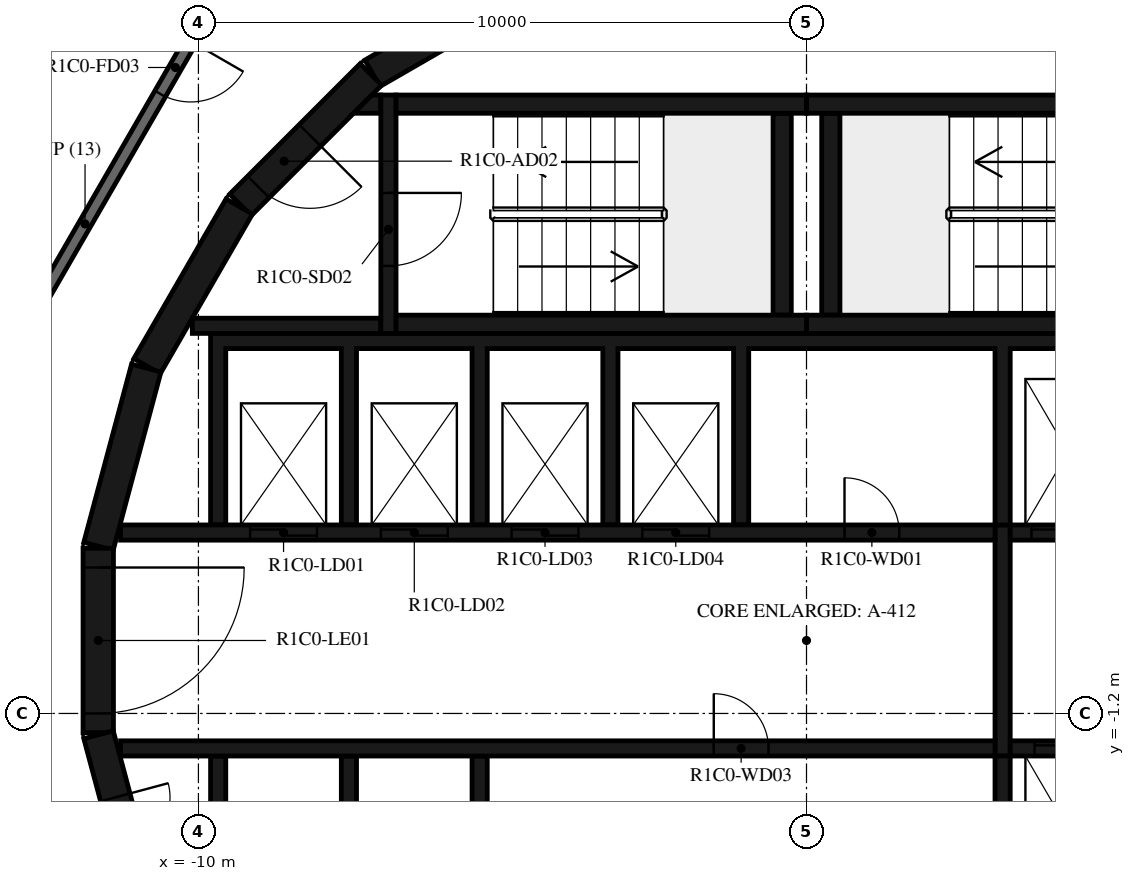
"""IFC4 building model, lengths in metres.
Left out: names, types, materials, properties, quantities, classifications, styles, units other than length and angle.
Written with IfcOpenShell. Run it as: python <this file> out.ifc"""

import sys

from ifc_helpers import new_model, si_unit, direction, frame, frame_2d, origin, place, context, subcontext, project, spatial, polyline, rectangle, outline, extrude, element, fill, save


model = new_model("IFC4")
c1 = context("Model", 3, precision=1e-05, world=origin(), true_north=direction((0.0, 1.0)))
c2 = subcontext(c1, "Body", "Model", "MODEL_VIEW")
j1 = project(units=[si_unit("LENGTHUNIT", "METRE"), si_unit("PLANEANGLEUNIT", "RADIAN")], contexts=[c1])
p1 = place(None, origin())
s1 = spatial("IfcSite", under=j1, at=p1, CompositionType="ELEMENT")
p2 = place(p1, origin())
s2 = spatial("IfcBuilding", under=s1, at=p2, CompositionType="ELEMENT")
p3 = place(p2, frame((0.0, 0.0, 59.4)))
s3 = spatial("IfcBuildingStorey", under=s2, at=p3, CompositionType="ELEMENT", Elevation=59.4)
p4 = place(p3, frame((-4.51, 10.845, 0.0), z_axis=(0.0, 0.0, 1.0), x_axis=(-0.865975092491, -0.500087131594, 0.0)))
e1 = element("IfcWall", 1, at=p4, inside=s3, PredefinedType="SHEAR", context=c2, shape_type="SweptSolid", body=[
    extrude(rectangle(XDim=3.033, YDim=0.5, at=frame_2d((1.516, 0.0))), origin(), (0.0, 0.0, 1.0), 3.12),
])
p5 = place(p3, frame((-7.164, 9.308, 0.0), z_axis=(0.0, 0.0, 1.0), x_axis=(-0.707106781187, -0.707106781187, 0.0)))
e2 = element("IfcWall", 2, at=p5, inside=s3, PredefinedType="SHEAR", context=c2, shape_type="SweptSolid", body=[
    extrude(rectangle(XDim=3.032, YDim=0.5, at=frame_2d((1.516, 0.0))), origin(), (0.0, 0.0, 1.0), 3.12),
])
p6 = place(p5, frame((1.416, 0.0, 0.0)))
e3 = element("IfcOpeningElement", 3, at=p6, cuts=e2, PredefinedType="OPENING", context=c2, shape_type="SweptSolid", body=[
    extrude(rectangle(XDim=1.2, YDim=2.1, at=frame_2d((0.6, 1.05))), frame((0.0, 0.26, 0.0), z_axis=(0.0, -1.0, 0.0), x_axis=(1.0, 0.0, 0.0)), (0.0, 0.0, 1.0), 0.52),
])
for number, where, z_axis, x_axis in (
    (4, (-9.329, 7.137, 0.0), (0.0, 0.0, 1.0), (-0.5, -0.866, 0.0)),
    (5, (-10.858, 4.479, 0.0), (0.0, 0.0, 1.0), (-0.259, -0.966, 0.0)),
):
    element("IfcWall", number, at=place(p3, frame(where, z_axis=z_axis, x_axis=x_axis)), inside=s3, PredefinedType="SHEAR", context=c2, shape_type="SweptSolid", body=[
        extrude(rectangle(XDim=3.033, YDim=0.5, at=frame_2d((1.516, 0.0))), origin(), (0.0, 0.0, 1.0), 3.12),
    ])
p7 = place(p3, frame((-11.647, 1.516, 0.0), z_axis=(0.0, 0.0, 1.0), x_axis=(0.0, -1.0, 0.0)))
e6 = element("IfcWall", 6, at=p7, inside=s3, PredefinedType="SHEAR", context=c2, shape_type="SweptSolid", body=[
    extrude(rectangle(XDim=3.033, YDim=0.5, at=frame_2d((1.516, 0.0))), origin(), (0.0, 0.0, 1.0), 3.12),
])
p8 = place(p7, frame((0.316, 0.0, 0.0)))
e7 = element("IfcOpeningElement", 7, at=p8, cuts=e6, PredefinedType="OPENING", context=c2, shape_type="SweptSolid", body=[
    extrude(rectangle(XDim=2.4, YDim=2.1, at=frame_2d((1.2, 1.05))), frame((0.0, 0.26, 0.0), z_axis=(0.0, -1.0, 0.0), x_axis=(1.0, 0.0, 0.0)), (0.0, 0.0, 1.0), 0.52),
])
p9 = place(p3, frame((-11.643, -1.55, 0.0), z_axis=(0.0, 0.0, 1.0), x_axis=(0.258734743916, -0.965948410781, 0.0)))
e8 = element("IfcWall", 8, at=p9, inside=s3, PredefinedType="SHEAR", context=c2, shape_type="SweptSolid", body=[
    extrude(rectangle(XDim=3.033, YDim=0.5, at=frame_2d((1.516, 0.0))), origin(), (0.0, 0.0, 1.0), 3.12),
])
p10 = place(p9, frame((1.066, 0.0, 0.0)))
e9 = element("IfcOpeningElement", 9, at=p10, cuts=e8, PredefinedType="OPENING", context=c2, shape_type="SweptSolid", body=[
    extrude(rectangle(XDim=0.9, YDim=2.1, at=frame_2d((0.45, 1.05))), frame((0.0, 0.26, 0.0), z_axis=(0.0, -1.0, 0.0), x_axis=(1.0, 0.0, 0.0)), (0.0, 0.0, 1.0), 0.52),
])
for number, where, z_axis, x_axis in (
    (10, (0.0, 5.2, 0.0), (0.0, 0.0, 1.0), (1.0, 0.0, 0.0)),
    (11, (0.0, 8.82, 0.0), (0.0, 0.0, 1.0), (1.0, 0.0, 0.0)),
):
    element("IfcWall", number, at=place(p3, frame(where, z_axis=z_axis, x_axis=x_axis)), inside=s3, PredefinedType="SHEAR", context=c2, shape_type="SweptSolid", body=[
        extrude(rectangle(XDim=6.75, YDim=0.3, at=frame_2d((3.375, 0.0))), origin(), (0.0, 0.0, 1.0), 3.12),
    ])
p11 = place(p3, frame((0.4, 5.35, 0.0), z_axis=(0.0, 0.0, 1.0), x_axis=(0.0, 1.0, 0.0)))
e12 = element("IfcWall", 12, at=p11, inside=s3, PredefinedType="SHEAR", context=c2, shape_type="SweptSolid", body=[
    extrude(rectangle(XDim=3.32, YDim=0.3, at=frame_2d((1.66, 0.0))), origin(), (0.0, 0.0, 1.0), 3.12),
])
for number, where, z_axis, x_axis in (
    (13, (-6.75, 5.2, 0.0), (0.0, 0.0, 1.0), (1.0, 0.0, 0.0)),
    (14, (-6.75, 8.82, 0.0), (0.0, 0.0, 1.0), (1.0, 0.0, 0.0)),
):
    element("IfcWall", number, at=place(p3, frame(where, z_axis=z_axis, x_axis=x_axis)), inside=s3, PredefinedType="SHEAR", context=c2, shape_type="SweptSolid", body=[
        extrude(rectangle(XDim=6.75, YDim=0.3, at=frame_2d((3.375, 0.0))), origin(), (0.0, 0.0, 1.0), 3.12),
    ])
p12 = place(p3, frame((-0.4, 5.35, 0.0), z_axis=(0.0, 0.0, 1.0), x_axis=(0.0, 1.0, 0.0)))
e15 = element("IfcWall", 15, at=p12, inside=s3, PredefinedType="SHEAR", context=c2, shape_type="SweptSolid", body=[
    extrude(rectangle(XDim=3.32, YDim=0.3, at=frame_2d((1.66, 0.0))), origin(), (0.0, 0.0, 1.0), 3.12),
])
p13 = place(p3, frame((-6.875, 8.97, 0.0), z_axis=(0.0, 0.0, 1.0), x_axis=(0.0, -1.0, 0.0)))
e16 = element("IfcWall", 16, at=p13, inside=s3, PredefinedType="SHEAR", context=c2, shape_type="SweptSolid", body=[
    extrude(rectangle(XDim=3.92, YDim=0.25, at=frame_2d((1.96, 0.0))), origin(), (0.0, 0.0, 1.0), 3.12),
])
p14 = place(p13, frame((1.61, 0.0, 0.0)))
e17 = element("IfcOpeningElement", 17, at=p14, cuts=e16, PredefinedType="OPENING", context=c2, shape_type="SweptSolid", body=[
    extrude(rectangle(XDim=1.2, YDim=2.1, at=frame_2d((0.6, 1.05))), frame((0.0, 0.135, 0.0), z_axis=(0.0, -1.0, 0.0), x_axis=(1.0, 0.0, 0.0)), (0.0, 0.0, 1.0), 0.27),
])
p15 = place(p3, frame((-7.0, 5.175, 0.0), z_axis=(0.0, 0.0, 1.0), x_axis=(-1.0, 0.0, 0.0)))
e18 = element("IfcWall", 18, at=p15, inside=s3, PredefinedType="SHEAR", context=c2, shape_type="SweptSolid", body=[
    extrude(rectangle(XDim=3.1, YDim=0.25, at=frame_2d((1.55, 0.0))), origin(), (0.0, 0.0, 1.0), 3.12),
])
p16 = place(p3, origin())
e19 = element("IfcWall", 19, at=p16, inside=s3, PredefinedType="SHEAR", context=c2, shape_type="SweptSolid", body=[
    extrude(outline(polyline([(-7.148, 8.97), (-7.0, 8.97), (-7.0, 8.67), (-7.448, 8.67), (-7.148, 8.97)])), origin(), (0.0, 0.0, 1.0), 3.12),
])
p17 = place(p3, origin())
e20 = element("IfcWall", 20, at=p17, inside=s3, PredefinedType="SHEAR", context=c2, shape_type="SweptSolid", body=[
    extrude(outline(polyline([(-9.55, 4.8), (-7.65, 4.8), (-7.65, 1.9), (-7.4, 1.9), (-7.4, 4.8), (-5.5, 4.8), (-5.5, 1.9), (-5.25, 1.9), (-5.25, 4.8), (-3.35, 4.8), (-3.35, 1.9), (-3.1, 1.9), (-3.1, 4.8), (-1.2, 4.8), (-1.2, 1.9), (-0.95, 1.9), (-0.95, 4.8), (3.1, 4.8), (3.1, 1.9), (3.35, 1.9), (3.35, 4.8), (5.25, 4.8), (5.25, 1.9), (5.5, 1.9), (5.5, 4.8), (7.4, 4.8), (7.4, 1.9), (7.65, 1.9), (7.65, 4.8), (9.55, 4.8), (9.55, 1.9), (9.8, 1.9), (9.8, 4.8), (9.8, 5.05), (-9.8, 5.05), (-9.8, 4.8), (-9.8, 1.9), (-9.55, 1.9), (-9.55, 4.8)])), origin(), (0.0, 0.0, 1.0), 3.12),
])
p18 = place(p3, origin())
e21 = element("IfcWall", 21, at=p18, inside=s3, PredefinedType="SHEAR", context=c2, shape_type="SweptSolid", body=[
    extrude(outline(polyline([(9.8, -5.05), (9.8, -4.8), (9.8, -1.9), (9.55, -1.9), (9.55, -4.8), (7.65, -4.8), (7.65, -1.9), (7.4, -1.9), (7.4, -4.8), (5.5, -4.8), (5.5, -1.9), (5.25, -1.9), (5.25, -4.8), (3.35, -4.8), (3.35, -1.9), (3.1, -1.9), (3.1, -4.8), (-5.25, -4.8), (-5.25, -1.9), (-5.5, -1.9), (-5.5, -4.8), (-7.4, -4.8), (-7.4, -1.9), (-7.65, -1.9), (-7.65, -4.8), (-9.55, -4.8), (-9.55, -1.9), (-9.8, -1.9), (-9.8, -4.8), (-9.8, -5.05), (9.8, -5.05)])), origin(), (0.0, 0.0, 1.0), 3.12),
])
p19 = place(p3, frame((-11.28, 1.775, 0.0), z_axis=(0.0, 0.0, 1.0), x_axis=(1.0, 0.0, 0.0)))
e22 = element("IfcWall", 22, at=p19, inside=s3, PredefinedType="SHEAR", context=c2, shape_type="SweptSolid", body=[
    extrude(rectangle(XDim=14.38, YDim=0.25, at=frame_2d((7.19, 0.0))), origin(), (0.0, 0.0, 1.0), 3.12),
])
p20 = place(p19, frame((2.13, 0.0, 0.0)))
e23 = element("IfcOpeningElement", 23, at=p20, cuts=e22, PredefinedType="OPENING", context=c2, shape_type="SweptSolid", body=[
    extrude(rectangle(XDim=1.1, YDim=2.1, at=frame_2d((0.55, 1.05))), frame((0.0, 0.135, 0.0), z_axis=(0.0, -1.0, 0.0), x_axis=(1.0, 0.0, 0.0)), (0.0, 0.0, 1.0), 0.27),
])
p21 = place(p19, frame((4.28, 0.0, 0.0)))
e24 = element("IfcOpeningElement", 24, at=p21, cuts=e22, PredefinedType="OPENING", context=c2, shape_type="SweptSolid", body=[
    extrude(rectangle(XDim=1.1, YDim=2.1, at=frame_2d((0.55, 1.05))), frame((0.0, 0.135, 0.0), z_axis=(0.0, -1.0, 0.0), x_axis=(1.0, 0.0, 0.0)), (0.0, 0.0, 1.0), 0.27),
])
p22 = place(p19, frame((6.43, 0.0, 0.0)))
e25 = element("IfcOpeningElement", 25, at=p22, cuts=e22, PredefinedType="OPENING", context=c2, shape_type="SweptSolid", body=[
    extrude(rectangle(XDim=1.1, YDim=2.1, at=frame_2d((0.55, 1.05))), frame((0.0, 0.135, 0.0), z_axis=(0.0, -1.0, 0.0), x_axis=(1.0, 0.0, 0.0)), (0.0, 0.0, 1.0), 0.27),
])
p23 = place(p19, frame((8.58, 0.0, 0.0)))
e26 = element("IfcOpeningElement", 26, at=p23, cuts=e22, PredefinedType="OPENING", context=c2, shape_type="SweptSolid", body=[
    extrude(rectangle(XDim=1.1, YDim=2.1, at=frame_2d((0.55, 1.05))), frame((0.0, 0.135, 0.0), z_axis=(0.0, -1.0, 0.0), x_axis=(1.0, 0.0, 0.0)), (0.0, 0.0, 1.0), 0.27),
])
p24 = place(p19, frame((11.905, 0.0, 0.0)))
e27 = element("IfcOpeningElement", 27, at=p24, cuts=e22, PredefinedType="OPENING", context=c2, shape_type="SweptSolid", body=[
    extrude(rectangle(XDim=0.9, YDim=2.1, at=frame_2d((0.45, 1.05))), frame((0.0, 0.135, 0.0), z_axis=(0.0, -1.0, 0.0), x_axis=(1.0, 0.0, 0.0)), (0.0, 0.0, 1.0), 0.27),
])
p25 = place(p3, frame((3.35, 1.775, 0.0), z_axis=(0.0, 0.0, 1.0), x_axis=(1.0, 0.0, 0.0)))
e28 = element("IfcWall", 28, at=p25, inside=s3, PredefinedType="SHEAR", context=c2, shape_type="SweptSolid", body=[
    extrude(rectangle(XDim=7.93, YDim=0.25, at=frame_2d((3.965, 0.0))), origin(), (0.0, 0.0, 1.0), 3.12),
])
p26 = place(p25, frame((0.35, 0.0, 0.0)))
e29 = element("IfcOpeningElement", 29, at=p26, cuts=e28, PredefinedType="OPENING", context=c2, shape_type="SweptSolid", body=[
    extrude(rectangle(XDim=1.2, YDim=2.4, at=frame_2d((0.6, 1.2))), frame((0.0, 0.135, 0.0), z_axis=(0.0, -1.0, 0.0), x_axis=(1.0, 0.0, 0.0)), (0.0, 0.0, 1.0), 0.27),
])
p27 = place(p25, frame((2.5, 0.0, 0.0)))
e30 = element("IfcOpeningElement", 30, at=p27, cuts=e28, PredefinedType="OPENING", context=c2, shape_type="SweptSolid", body=[
    extrude(rectangle(XDim=1.2, YDim=2.4, at=frame_2d((0.6, 1.2))), frame((0.0, 0.135, 0.0), z_axis=(0.0, -1.0, 0.0), x_axis=(1.0, 0.0, 0.0)), (0.0, 0.0, 1.0), 0.27),
])
p28 = place(p25, frame((4.8, 0.0, 0.0)))
e31 = element("IfcOpeningElement", 31, at=p28, cuts=e28, PredefinedType="OPENING", context=c2, shape_type="SweptSolid", body=[
    extrude(rectangle(XDim=0.9, YDim=2.1, at=frame_2d((0.45, 1.05))), frame((0.0, 0.135, 0.0), z_axis=(0.0, -1.0, 0.0), x_axis=(1.0, 0.0, 0.0)), (0.0, 0.0, 1.0), 0.27),
])
p29 = place(p3, frame((-11.28, -1.775, 0.0), z_axis=(0.0, 0.0, 1.0), x_axis=(1.0, 0.0, 0.0)))
e32 = element("IfcWall", 32, at=p29, inside=s3, PredefinedType="SHEAR", context=c2, shape_type="SweptSolid", body=[
    extrude(rectangle(XDim=14.38, YDim=0.25, at=frame_2d((7.19, 0.0))), origin(), (0.0, 0.0, 1.0), 3.12),
])
p30 = place(p29, frame((9.755, 0.0, 0.0)))
e33 = element("IfcOpeningElement", 33, at=p30, cuts=e32, PredefinedType="OPENING", context=c2, shape_type="SweptSolid", body=[
    extrude(rectangle(XDim=0.9, YDim=2.1, at=frame_2d((0.45, 1.05))), frame((0.0, 0.135, 0.0), z_axis=(0.0, -1.0, 0.0), x_axis=(1.0, 0.0, 0.0)), (0.0, 0.0, 1.0), 0.27),
])
p31 = place(p3, frame((3.35, -1.775, 0.0), z_axis=(0.0, 0.0, 1.0), x_axis=(1.0, 0.0, 0.0)))
e34 = element("IfcWall", 34, at=p31, inside=s3, PredefinedType="SHEAR", context=c2, shape_type="SweptSolid", body=[
    extrude(rectangle(XDim=7.93, YDim=0.25, at=frame_2d((3.965, 0.0))), origin(), (0.0, 0.0, 1.0), 3.12),
])
p32 = place(p31, frame((0.4, 0.0, 0.0)))
e35 = element("IfcOpeningElement", 35, at=p32, cuts=e34, PredefinedType="OPENING", context=c2, shape_type="SweptSolid", body=[
    extrude(rectangle(XDim=1.1, YDim=2.4, at=frame_2d((0.55, 1.2))), frame((0.0, 0.135, 0.0), z_axis=(0.0, -1.0, 0.0), x_axis=(1.0, 0.0, 0.0)), (0.0, 0.0, 1.0), 0.27),
])
p33 = place(p31, frame((2.55, 0.0, 0.0)))
e36 = element("IfcOpeningElement", 36, at=p33, cuts=e34, PredefinedType="OPENING", context=c2, shape_type="SweptSolid", body=[
    extrude(rectangle(XDim=1.1, YDim=2.4, at=frame_2d((0.55, 1.2))), frame((0.0, 0.135, 0.0), z_axis=(0.0, -1.0, 0.0), x_axis=(1.0, 0.0, 0.0)), (0.0, 0.0, 1.0), 0.27),
])
p34 = place(p31, frame((4.7, 0.0, 0.0)))
e37 = element("IfcOpeningElement", 37, at=p34, cuts=e34, PredefinedType="OPENING", context=c2, shape_type="SweptSolid", body=[
    extrude(rectangle(XDim=1.1, YDim=2.4, at=frame_2d((0.55, 1.2))), frame((0.0, 0.135, 0.0), z_axis=(0.0, -1.0, 0.0), x_axis=(1.0, 0.0, 0.0)), (0.0, 0.0, 1.0), 0.27),
])
p35 = place(p3, frame((3.225, -1.9, 0.0), z_axis=(0.0, 0.0, 1.0), x_axis=(0.0, 1.0, 0.0)))
e38 = element("IfcWall", 38, at=p35, inside=s3, PredefinedType="SHEAR", context=c2, shape_type="SweptSolid", body=[
    extrude(rectangle(XDim=3.8, YDim=0.25, at=frame_2d((1.9, 0.0))), origin(), (0.0, 0.0, 1.0), 3.12),
])
p36 = place(p3, frame((-10.029, 10.029, 0.0), z_axis=(0.0, 0.0, 1.0), x_axis=(-0.500001669485, -0.866024439905, 0.0)))
e39 = element("IfcWall", 39, at=p36, inside=s3, PredefinedType="STANDARD", context=c2, shape_type="SweptSolid", body=[
    extrude(rectangle(XDim=7.342, YDim=0.2, at=frame_2d((3.671, 0.0))), origin(), (0.0, 0.0, 1.0), 3.12),
])
p37 = place(p36, frame((0.2, 0.0, 0.0)))
e40 = element("IfcOpeningElement", 40, at=p37, cuts=e39, PredefinedType="OPENING", context=c2, shape_type="SweptSolid", body=[
    extrude(rectangle(XDim=1.0, YDim=2.1, at=frame_2d((0.5, 1.05))), frame((0.0, 0.11, 0.0), z_axis=(0.0, -1.0, 0.0), x_axis=(1.0, 0.0, 0.0)), (0.0, 0.0, 1.0), 0.22),
])
p38 = place(p14, origin())
e41 = element("IfcDoor", 41, at=p38, inside=s3, OperationType="SINGLE_SWING_LEFT", PredefinedType="DOOR", context=c2, shape_type="SweptSolid", body=[
    extrude(rectangle(XDim=1.2, YDim=2.1, at=frame_2d((0.6, 1.05))), frame((0.0, 0.025, 0.0), z_axis=(0.0, -1.0, 0.0), x_axis=(1.0, 0.0, 0.0)), (0.0, 0.0, 1.0), 0.05),
])
fill(e17, e41)
p39 = place(p6, origin())
e42 = element("IfcDoor", 42, at=p39, inside=s3, OperationType="SINGLE_SWING_RIGHT", PredefinedType="DOOR", context=c2, shape_type="SweptSolid", body=[
    extrude(rectangle(XDim=1.2, YDim=2.1, at=frame_2d((0.6, 1.05))), frame((0.0, 0.025, 0.0), z_axis=(0.0, -1.0, 0.0), x_axis=(1.0, 0.0, 0.0)), (0.0, 0.0, 1.0), 0.05),
])
fill(e3, e42)
p40 = place(p8, origin())
e43 = element("IfcDoor", 43, at=p40, inside=s3, OperationType="DOUBLE_DOOR_SINGLE_SWING", PredefinedType="DOOR", context=c2, shape_type="SweptSolid", body=[
    extrude(rectangle(XDim=2.4, YDim=2.1, at=frame_2d((1.2, 1.05))), frame((0.0, 0.025, 0.0), z_axis=(0.0, -1.0, 0.0), x_axis=(1.0, 0.0, 0.0)), (0.0, 0.0, 1.0), 0.05),
])
fill(e7, e43)
p41 = place(p20, origin())
e44 = element("IfcDoor", 44, at=p41, inside=s3, OperationType="DOUBLE_DOOR_SLIDING", PredefinedType="DOOR", context=c2, shape_type="SweptSolid", body=[
    extrude(rectangle(XDim=1.1, YDim=2.1, at=frame_2d((0.55, 1.05))), frame((0.0, 0.025, 0.0), z_axis=(0.0, -1.0, 0.0), x_axis=(1.0, 0.0, 0.0)), (0.0, 0.0, 1.0), 0.05),
])
fill(e23, e44)
p42 = place(p21, origin())
e45 = element("IfcDoor", 45, at=p42, inside=s3, OperationType="DOUBLE_DOOR_SLIDING", PredefinedType="DOOR", context=c2, shape_type="SweptSolid", body=[
    extrude(rectangle(XDim=1.1, YDim=2.1, at=frame_2d((0.55, 1.05))), frame((0.0, 0.025, 0.0), z_axis=(0.0, -1.0, 0.0), x_axis=(1.0, 0.0, 0.0)), (0.0, 0.0, 1.0), 0.05),
])
fill(e24, e45)
p43 = place(p22, origin())
e46 = element("IfcDoor", 46, at=p43, inside=s3, OperationType="DOUBLE_DOOR_SLIDING", PredefinedType="DOOR", context=c2, shape_type="SweptSolid", body=[
    extrude(rectangle(XDim=1.1, YDim=2.1, at=frame_2d((0.55, 1.05))), frame((0.0, 0.025, 0.0), z_axis=(0.0, -1.0, 0.0), x_axis=(1.0, 0.0, 0.0)), (0.0, 0.0, 1.0), 0.05),
])
fill(e25, e46)
p44 = place(p23, origin())
e47 = element("IfcDoor", 47, at=p44, inside=s3, OperationType="DOUBLE_DOOR_SLIDING", PredefinedType="DOOR", context=c2, shape_type="SweptSolid", body=[
    extrude(rectangle(XDim=1.1, YDim=2.1, at=frame_2d((0.55, 1.05))), frame((0.0, 0.025, 0.0), z_axis=(0.0, -1.0, 0.0), x_axis=(1.0, 0.0, 0.0)), (0.0, 0.0, 1.0), 0.05),
])
fill(e26, e47)
p45 = place(p26, origin())
e48 = element("IfcDoor", 48, at=p45, inside=s3, OperationType="DOUBLE_DOOR_SLIDING", PredefinedType="DOOR", context=c2, shape_type="SweptSolid", body=[
    extrude(rectangle(XDim=1.2, YDim=2.4, at=frame_2d((0.6, 1.2))), frame((0.0, 0.025, 0.0), z_axis=(0.0, -1.0, 0.0), x_axis=(1.0, 0.0, 0.0)), (0.0, 0.0, 1.0), 0.05),
])
fill(e29, e48)
p46 = place(p32, origin())
e49 = element("IfcDoor", 49, at=p46, inside=s3, OperationType="DOUBLE_DOOR_SLIDING", PredefinedType="DOOR", context=c2, shape_type="SweptSolid", body=[
    extrude(rectangle(XDim=1.1, YDim=2.4, at=frame_2d((0.55, 1.2))), frame((0.0, 0.025, 0.0), z_axis=(0.0, -1.0, 0.0), x_axis=(1.0, 0.0, 0.0)), (0.0, 0.0, 1.0), 0.05),
])
fill(e35, e49)
p47 = place(p24, origin())
e50 = element("IfcDoor", 50, at=p47, inside=s3, OperationType="SINGLE_SWING_RIGHT", PredefinedType="DOOR", context=c2, shape_type="SweptSolid", body=[
    extrude(rectangle(XDim=0.9, YDim=2.1, at=frame_2d((0.45, 1.05))), frame((0.0, 0.025, 0.0), z_axis=(0.0, -1.0, 0.0), x_axis=(1.0, 0.0, 0.0)), (0.0, 0.0, 1.0), 0.05),
])
fill(e27, e50)
p48 = place(p30, origin())
e51 = element("IfcDoor", 51, at=p48, inside=s3, OperationType="SINGLE_SWING_RIGHT", PredefinedType="DOOR", context=c2, shape_type="SweptSolid", body=[
    extrude(rectangle(XDim=0.9, YDim=2.1, at=frame_2d((0.45, 1.05))), frame((0.0, 0.025, 0.0), z_axis=(0.0, -1.0, 0.0), x_axis=(1.0, 0.0, 0.0)), (0.0, 0.0, 1.0), 0.05),
])
fill(e33, e51)
p49 = place(p10, origin())
e52 = element("IfcDoor", 52, at=p49, inside=s3, OperationType="SINGLE_SWING_LEFT", PredefinedType="DOOR", context=c2, shape_type="SweptSolid", body=[
    extrude(rectangle(XDim=0.9, YDim=2.1, at=frame_2d((0.45, 1.05))), frame((0.0, 0.025, 0.0), z_axis=(0.0, -1.0, 0.0), x_axis=(1.0, 0.0, 0.0)), (0.0, 0.0, 1.0), 0.05),
])
fill(e9, e52)
p50 = place(p37, origin())
e53 = element("IfcDoor", 53, at=p50, inside=s3, OperationType="SINGLE_SWING_LEFT", PredefinedType="DOOR", context=c2, shape_type="SweptSolid", body=[
    extrude(rectangle(XDim=1.0, YDim=2.1, at=frame_2d((0.5, 1.05))), frame((0.0, 0.025, 0.0), z_axis=(0.0, -1.0, 0.0), x_axis=(1.0, 0.0, 0.0)), (0.0, 0.0, 1.0), 0.05),
])
fill(e40, e53)
save(model, sys.argv[1])
